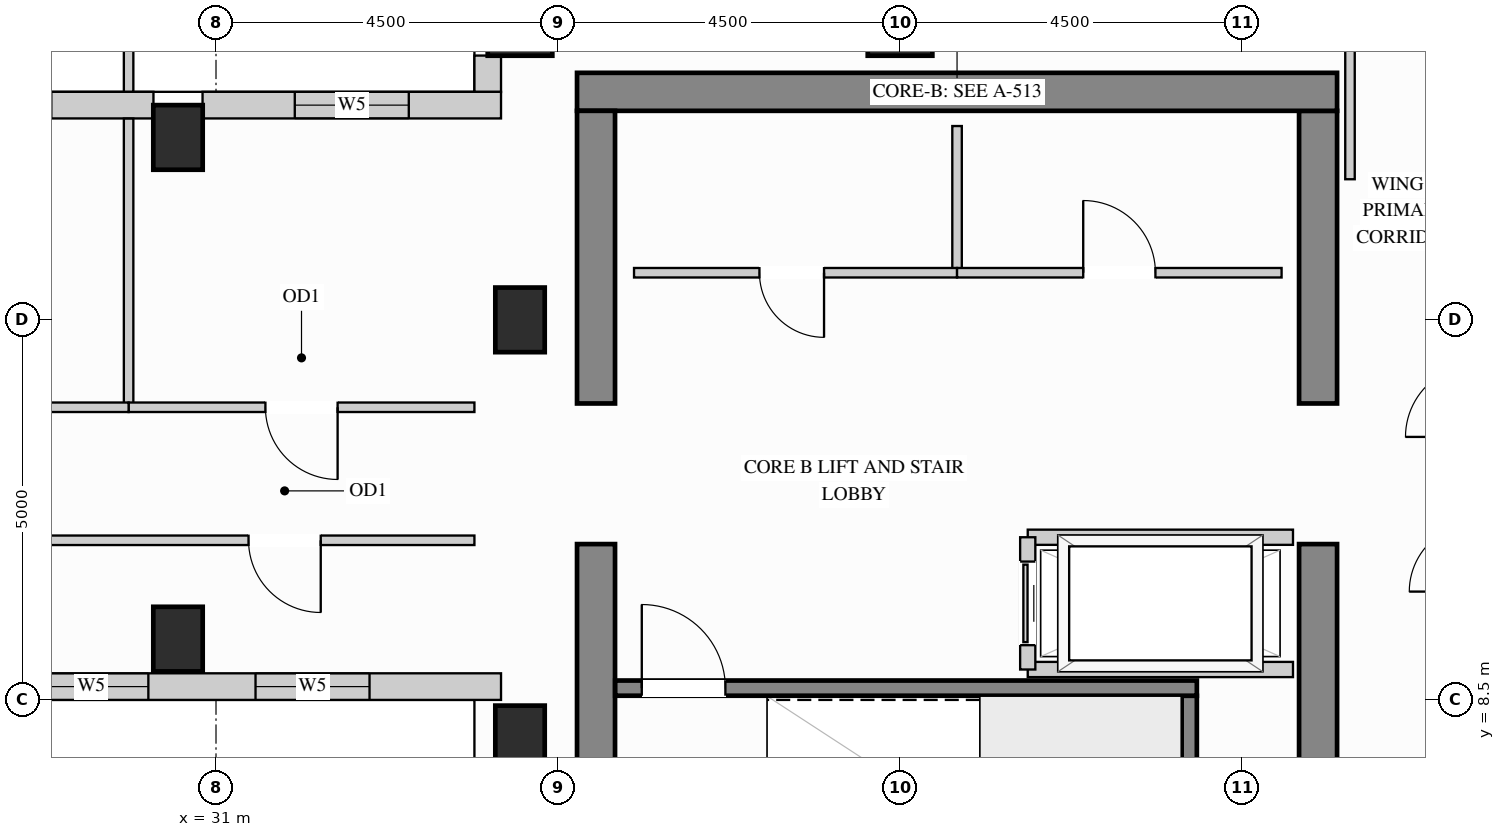
"""IFC4 building model, lengths in metres.
Left out: names, types, materials, properties, quantities, classifications, styles, units other than length and angle.
Written with IfcOpenShell. Run it as: python <this file> out.ifc"""

import sys

from ifc_helpers import new_model, si_unit, direction, frame, frame_2d, origin, origin_2d, place, context, subcontext, project, spatial, rectangle, extrude, source, transform, mapped, element, fill, save


model = new_model("IFC4")
c1 = context("Model", 3, precision=1e-05, world=origin(), true_north=direction((0.0, 1.0)))
c2 = subcontext(c1, "Body", "Model", "MODEL_VIEW")
j1 = project(units=[si_unit("LENGTHUNIT", "METRE"), si_unit("PLANEANGLEUNIT", "RADIAN")], contexts=[c1])
p1 = place(None, origin())
s1 = spatial("IfcSite", under=j1, at=p1, CompositionType="ELEMENT")
p2 = place(p1, origin())
s2 = spatial("IfcBuilding", under=s1, at=p2, CompositionType="ELEMENT")
p3 = place(p2, frame((0.0, 0.0, 237.6)))
s3 = spatial("IfcBuildingStorey", under=s2, at=p3, CompositionType="ELEMENT", Elevation=237.6)
m1 = source(origin(), c2, "Body", "SweptSolid", [
    extrude(rectangle(XDim=0.65, YDim=0.85, at=origin_2d()), origin(), (0.0, 0.0, 1.0), 3.4),
])
for number, where, z_axis, x_axis in (
    (1, (35.0, 13.5, 0.0), (0.0, 0.0, 1.0), (1.0, 0.0, 0.0)),
    (2, (35.0, 8.0, 0.0), (0.0, 0.0, 1.0), (1.0, 0.0, 0.0)),
    (3, (30.5, 15.9, 0.0), (0.0, 0.0, 1.0), (1.0, 0.0, 0.0)),
    (4, (30.5, 9.3, 0.0), (0.0, 0.0, 1.0), (1.0, 0.0, 0.0)),
):
    element("IfcColumn", number, at=place(p3, frame(where, z_axis=z_axis, x_axis=x_axis)), inside=s3, PredefinedType="COLUMN", context=c2, shape_type="MappedRepresentation", body=[
        mapped(m1, transform((0.0, 0.0, 0.0), x_axis=(1.0, 0.0, 0.0), y_axis=(0.0, 1.0, 0.0), z_axis=(0.0, 0.0, 1.0))),
    ])
m2 = source(origin(), c2, "Body", "SweptSolid", [
    extrude(rectangle(XDim=0.85, YDim=0.85, at=origin_2d()), origin(), (0.0, 0.0, 1.0), 3.4),
])
for number, where, z_axis, x_axis in (
    (5, (35.0, 17.4, 0.0), (0.0, 0.0, 1.0), (1.0, 0.0, 0.0)),
    (6, (40.0, 17.4, 0.0), (0.0, 0.0, 1.0), (1.0, 0.0, 0.0)),
):
    element("IfcColumn", number, at=place(p3, frame(where, z_axis=z_axis, x_axis=x_axis)), inside=s3, PredefinedType="COLUMN", context=c2, shape_type="MappedRepresentation", body=[
        mapped(m2, transform((0.0, 0.0, 0.0), x_axis=(1.0, 0.0, 0.0), y_axis=(0.0, 1.0, 0.0), z_axis=(0.0, 0.0, 1.0))),
    ])
m3 = source(origin(), c2, "Body", "SweptSolid", [
    extrude(rectangle(XDim=5.8, YDim=0.5, at=frame_2d((2.9, 0.0))), origin(), (0.0, 0.0, 1.0), 3.4),
])
p4 = place(p3, frame((45.5, 4.75, 0.0), z_axis=(0.0, 0.0, 1.0), x_axis=(0.0, 1.0, 0.0)))
e7 = element("IfcWall", 7, at=p4, inside=s3, PredefinedType="SHEAR", context=c2, shape_type="MappedRepresentation", body=[
    mapped(m3, transform((0.0, 0.0, 0.0), x_axis=(1.0, 0.0, 0.0), y_axis=(0.0, 1.0, 0.0), z_axis=(0.0, 0.0, 1.0))),
])
m4 = source(origin(), c2, "Body", "SweptSolid", [
    extrude(rectangle(XDim=3.85, YDim=0.5, at=frame_2d((1.925, 0.0))), origin(), (0.0, 0.0, 1.0), 3.4),
])
p5 = place(p3, frame((45.5, 12.4, 0.0), z_axis=(0.0, 0.0, 1.0), x_axis=(0.0, 1.0, 0.0)))
e8 = element("IfcWall", 8, at=p5, inside=s3, PredefinedType="SHEAR", context=c2, shape_type="MappedRepresentation", body=[
    mapped(m4, transform((0.0, 0.0, 0.0), x_axis=(1.0, 0.0, 0.0), y_axis=(0.0, 1.0, 0.0), z_axis=(0.0, 0.0, 1.0))),
])
m5 = source(origin(), c2, "Body", "SweptSolid", [
    extrude(rectangle(XDim=10.0, YDim=0.5, at=frame_2d((5.0, 0.0))), origin(), (0.0, 0.0, 1.0), 3.4),
])
p6 = place(p3, frame((35.75, 16.5, 0.0), z_axis=(0.0, 0.0, 1.0), x_axis=(1.0, 0.0, 0.0)))
e9 = element("IfcWall", 9, at=p6, inside=s3, PredefinedType="SHEAR", context=c2, shape_type="MappedRepresentation", body=[
    mapped(m5, transform((0.0, 0.0, 0.0), x_axis=(1.0, 0.0, 0.0), y_axis=(0.0, 1.0, 0.0), z_axis=(0.0, 0.0, 1.0))),
])
p7 = place(p3, frame((36.0, 4.75, 0.0), z_axis=(0.0, 0.0, 1.0), x_axis=(0.0, 1.0, 0.0)))
e10 = element("IfcWall", 10, at=p7, inside=s3, PredefinedType="SHEAR", context=c2, shape_type="MappedRepresentation", body=[
    mapped(m3, transform((0.0, 0.0, 0.0), x_axis=(1.0, 0.0, 0.0), y_axis=(0.0, 1.0, 0.0), z_axis=(0.0, 0.0, 1.0))),
])
p8 = place(p3, frame((36.0, 12.4, 0.0), z_axis=(0.0, 0.0, 1.0), x_axis=(0.0, 1.0, 0.0)))
e11 = element("IfcWall", 11, at=p8, inside=s3, PredefinedType="SHEAR", context=c2, shape_type="MappedRepresentation", body=[
    mapped(m4, transform((0.0, 0.0, 0.0), x_axis=(1.0, 0.0, 0.0), y_axis=(0.0, 1.0, 0.0), z_axis=(0.0, 0.0, 1.0))),
])
p9 = place(p3, frame((19.323, 8.675, 0.0), z_axis=(0.0, 0.0, 1.0), x_axis=(1.0, 0.0, 0.0)))
e12 = element("IfcWall", 12, at=p9, inside=s3, PredefinedType="SOLIDWALL", context=c2, shape_type="SweptSolid", body=[
    extrude(rectangle(XDim=15.427, YDim=0.35, at=frame_2d((7.713, 0.0))), origin(), (0.0, 0.0, 1.0), 3.385),
])
p10 = place(p9, frame((1.672, 0.0, 0.78)))
e13 = element("IfcOpeningElement", 13, at=p10, cuts=e12, PredefinedType="OPENING", context=c2, shape_type="SweptSolid", body=[
    extrude(rectangle(XDim=1.5, YDim=2.0, at=frame_2d((0.75, 1.0))), frame((0.0, 0.185, 0.0), z_axis=(0.0, -1.0, 0.0), x_axis=(1.0, 0.0, 0.0)), (0.0, 0.0, 1.0), 0.37),
])
p11 = place(p9, frame((4.525, 0.0, 0.78)))
e14 = element("IfcOpeningElement", 14, at=p11, cuts=e12, PredefinedType="OPENING", context=c2, shape_type="SweptSolid", body=[
    extrude(rectangle(XDim=1.5, YDim=2.0, at=frame_2d((0.75, 1.0))), frame((0.0, 0.185, 0.0), z_axis=(0.0, -1.0, 0.0), x_axis=(1.0, 0.0, 0.0)), (0.0, 0.0, 1.0), 0.37),
])
p12 = place(p9, frame((9.287, 0.0, 0.78)))
e15 = element("IfcOpeningElement", 15, at=p12, cuts=e12, PredefinedType="OPENING", context=c2, shape_type="SweptSolid", body=[
    extrude(rectangle(XDim=1.5, YDim=2.0, at=frame_2d((0.75, 1.0))), frame((0.0, 0.185, 0.0), z_axis=(0.0, -1.0, 0.0), x_axis=(1.0, 0.0, 0.0)), (0.0, 0.0, 1.0), 0.37),
])
p13 = place(p9, frame((12.197, 0.0, 0.78)))
e16 = element("IfcOpeningElement", 16, at=p13, cuts=e12, PredefinedType="OPENING", context=c2, shape_type="SweptSolid", body=[
    extrude(rectangle(XDim=1.5, YDim=2.0, at=frame_2d((0.75, 1.0))), frame((0.0, 0.185, 0.0), z_axis=(0.0, -1.0, 0.0), x_axis=(1.0, 0.0, 0.0)), (0.0, 0.0, 1.0), 0.37),
])
m6 = source(origin(), c2, "Body", "SweptSolid", [
    extrude(rectangle(XDim=0.479, YDim=0.35, at=frame_2d((0.24, 0.0))), origin(), (0.0, 0.0, 1.0), 3.385),
])
p14 = place(p3, frame((34.575, 16.977, 0.0), z_axis=(0.0, 0.0, 1.0), x_axis=(0.0, -1.0, 0.0)))
e17 = element("IfcWall", 17, at=p14, inside=s3, PredefinedType="SOLIDWALL", context=c2, shape_type="MappedRepresentation", body=[
    mapped(m6, transform((0.0, 0.0, 0.0), x_axis=(1.0, 0.0, 0.0), y_axis=(0.0, 1.0, 0.0), z_axis=(0.0, 0.0, 1.0))),
])
p15 = place(p3, frame((34.75, 16.325, 0.0), z_axis=(0.0, 0.0, 1.0), x_axis=(-1.0, 0.0, 0.0)))
e18 = element("IfcWall", 18, at=p15, inside=s3, PredefinedType="SOLIDWALL", context=c2, shape_type="SweptSolid", body=[
    extrude(rectangle(XDim=3.927, YDim=0.35, at=frame_2d((1.963, 0.0))), origin(), (0.0, 0.0, 1.0), 3.385),
])
p16 = place(p15, frame((1.213, 0.0, 0.78)))
e19 = element("IfcOpeningElement", 19, at=p16, cuts=e18, PredefinedType="OPENING", context=c2, shape_type="SweptSolid", body=[
    extrude(rectangle(XDim=1.5, YDim=2.0, at=frame_2d((0.75, 1.0))), frame((0.0, 0.185, 0.0), z_axis=(0.0, -1.0, 0.0), x_axis=(1.0, 0.0, 0.0)), (0.0, 0.0, 1.0), 0.37),
])
p17 = place(p3, frame((30.177, 16.325, 0.0), z_axis=(0.0, 0.0, 1.0), x_axis=(-1.0, 0.0, 0.0)))
e20 = element("IfcWall", 20, at=p17, inside=s3, PredefinedType="SOLIDWALL", context=c2, shape_type="SweptSolid", body=[
    extrude(rectangle(XDim=6.454, YDim=0.35, at=frame_2d((3.227, 0.0))), origin(), (0.0, 0.0, 1.0), 3.385),
])
p18 = place(p17, frame((1.344, 0.0, 0.78)))
e21 = element("IfcOpeningElement", 21, at=p18, cuts=e20, PredefinedType="OPENING", context=c2, shape_type="SweptSolid", body=[
    extrude(rectangle(XDim=1.5, YDim=2.0, at=frame_2d((0.75, 1.0))), frame((0.0, 0.185, 0.0), z_axis=(0.0, -1.0, 0.0), x_axis=(1.0, 0.0, 0.0)), (0.0, 0.0, 1.0), 0.37),
])
p19 = place(p17, frame((3.61, 0.0, 0.78)))
e22 = element("IfcOpeningElement", 22, at=p19, cuts=e20, PredefinedType="OPENING", context=c2, shape_type="SweptSolid", body=[
    extrude(rectangle(XDim=1.5, YDim=2.0, at=frame_2d((0.75, 1.0))), frame((0.0, 0.185, 0.0), z_axis=(0.0, -1.0, 0.0), x_axis=(1.0, 0.0, 0.0)), (0.0, 0.0, 1.0), 0.37),
])
m7 = source(origin(), c2, "Body", "SweptSolid", [
    extrude(rectangle(XDim=1.93, YDim=0.125, at=frame_2d((0.965, 0.0))), origin(), (0.0, 0.0, 1.0), 3.385),
])
p20 = place(p3, frame((40.75, 14.12, 0.0), z_axis=(0.0, 0.0, 1.0), x_axis=(0.0, 1.0, 0.0)))
e23 = element("IfcWall", 23, at=p20, inside=s3, PredefinedType="PARTITIONING", context=c2, shape_type="MappedRepresentation", body=[
    mapped(m7, transform((0.0, 0.0, 0.0), x_axis=(1.0, 0.0, 0.0), y_axis=(0.0, 1.0, 0.0), z_axis=(0.0, 0.0, 1.0))),
])
p21 = place(p3, frame((36.5, 14.12, 0.0), z_axis=(0.0, 0.0, 1.0), x_axis=(1.0, 0.0, 0.0)))
e24 = element("IfcWall", 24, at=p21, inside=s3, PredefinedType="PARTITIONING", context=c2, shape_type="SweptSolid", body=[
    extrude(rectangle(XDim=4.25, YDim=0.125, at=frame_2d((2.125, 0.0))), origin(), (0.0, 0.0, 1.0), 3.385),
])
p22 = place(p21, frame((1.65, 0.0, 0.0)))
e25 = element("IfcOpeningElement", 25, at=p22, cuts=e24, PredefinedType="OPENING", context=c2, shape_type="SweptSolid", body=[
    extrude(rectangle(XDim=0.85, YDim=2.1, at=frame_2d((0.425, 1.05))), frame((0.0, 0.073, 0.0), z_axis=(0.0, -1.0, 0.0), x_axis=(1.0, 0.0, 0.0)), (0.0, 0.0, 1.0), 0.145),
])
p23 = place(p3, frame((40.75, 14.12, 0.0), z_axis=(0.0, 0.0, 1.0), x_axis=(1.0, 0.0, 0.0)))
e26 = element("IfcWall", 26, at=p23, inside=s3, PredefinedType="PARTITIONING", context=c2, shape_type="SweptSolid", body=[
    extrude(rectangle(XDim=4.27, YDim=0.125, at=frame_2d((2.135, 0.0))), origin(), (0.0, 0.0, 1.0), 3.385),
])
p24 = place(p23, frame((1.66, 0.0, 0.0)))
e27 = element("IfcOpeningElement", 27, at=p24, cuts=e26, PredefinedType="OPENING", context=c2, shape_type="SweptSolid", body=[
    extrude(rectangle(XDim=0.95, YDim=2.15, at=frame_2d((0.475, 1.075))), frame((0.0, 0.073, 0.0), z_axis=(0.0, -1.0, 0.0), x_axis=(1.0, 0.0, 0.0)), (0.0, 0.0, 1.0), 0.145),
])
m8 = source(origin(), c2, "Body", "SweptSolid", [
    extrude(rectangle(XDim=2.298, YDim=0.125, at=frame_2d((1.149, 0.0))), origin(), (0.0, 0.0, 1.0), 3.385),
])
p25 = place(p3, frame((45.92, 15.35, 0.0), z_axis=(0.0, 0.0, 1.0), x_axis=(0.0, 1.0, 0.0)))
e28 = element("IfcWall", 28, at=p25, inside=s3, PredefinedType="PARTITIONING", context=c2, shape_type="MappedRepresentation", body=[
    mapped(m8, transform((0.0, 0.0, 0.0), x_axis=(1.0, 0.0, 0.0), y_axis=(0.0, 1.0, 0.0), z_axis=(0.0, 0.0, 1.0))),
])
m9 = source(origin(), c2, "Body", "SweptSolid", [
    extrude(rectangle(XDim=3.798, YDim=0.125, at=frame_2d((1.899, 0.0))), origin(), (0.0, 0.0, 1.0), 3.385),
])
p26 = place(p3, frame((29.85, 12.35, 0.0), z_axis=(0.0, 0.0, 1.0), x_axis=(0.0, 1.0, 0.0)))
e29 = element("IfcWall", 29, at=p26, inside=s3, PredefinedType="PARTITIONING", context=c2, shape_type="MappedRepresentation", body=[
    mapped(m9, transform((0.0, 0.0, 0.0), x_axis=(1.0, 0.0, 0.0), y_axis=(0.0, 1.0, 0.0), z_axis=(0.0, 0.0, 1.0))),
])
m10 = source(origin(), c2, "Body", "SweptSolid", [
    extrude(rectangle(XDim=7.148, YDim=0.125, at=frame_2d((3.574, 0.0))), origin(), (0.0, 0.0, 1.0), 3.385),
])
p27 = place(p3, frame((29.85, 16.502, 0.0), z_axis=(0.0, 0.0, 1.0), x_axis=(0.0, 1.0, 0.0)))
e30 = element("IfcWall", 30, at=p27, inside=s3, PredefinedType="PARTITIONING", context=c2, shape_type="MappedRepresentation", body=[
    mapped(m10, transform((0.0, 0.0, 0.0), x_axis=(1.0, 0.0, 0.0), y_axis=(0.0, 1.0, 0.0), z_axis=(0.0, 0.0, 1.0))),
])
p28 = place(p3, frame((29.85, 12.35, 0.0), z_axis=(0.0, 0.0, 1.0), x_axis=(1.0, 0.0, 0.0)))
e31 = element("IfcWall", 31, at=p28, inside=s3, PredefinedType="PARTITIONING", context=c2, shape_type="SweptSolid", body=[
    extrude(rectangle(XDim=4.55, YDim=0.125, at=frame_2d((2.275, 0.0))), origin(), (0.0, 0.0, 1.0), 3.385),
])
p29 = place(p28, frame((1.8, 0.0, 0.0)))
e32 = element("IfcOpeningElement", 32, at=p29, cuts=e31, PredefinedType="OPENING", context=c2, shape_type="SweptSolid", body=[
    extrude(rectangle(XDim=0.95, YDim=2.15, at=frame_2d((0.475, 1.075))), frame((0.0, 0.073, 0.0), z_axis=(0.0, -1.0, 0.0), x_axis=(1.0, 0.0, 0.0)), (0.0, 0.0, 1.0), 0.145),
])
p30 = place(p3, frame((24.05, 12.35, 0.0), z_axis=(0.0, 0.0, 1.0), x_axis=(1.0, 0.0, 0.0)))
e33 = element("IfcWall", 33, at=p30, inside=s3, PredefinedType="PARTITIONING", context=c2, shape_type="SweptSolid", body=[
    extrude(rectangle(XDim=5.8, YDim=0.125, at=frame_2d((2.9, 0.0))), origin(), (0.0, 0.0, 1.0), 3.385),
])
p31 = place(p30, frame((2.425, 0.0, 0.0)))
e34 = element("IfcOpeningElement", 34, at=p31, cuts=e33, PredefinedType="OPENING", context=c2, shape_type="SweptSolid", body=[
    extrude(rectangle(XDim=0.95, YDim=2.15, at=frame_2d((0.475, 1.075))), frame((0.0, 0.073, 0.0), z_axis=(0.0, -1.0, 0.0), x_axis=(1.0, 0.0, 0.0)), (0.0, 0.0, 1.0), 0.145),
])
p32 = place(p3, frame((26.95, 10.6, 0.0), z_axis=(0.0, 0.0, 1.0), x_axis=(1.0, 0.0, 0.0)))
e35 = element("IfcWall", 35, at=p32, inside=s3, PredefinedType="PARTITIONING", context=c2, shape_type="SweptSolid", body=[
    extrude(rectangle(XDim=7.45, YDim=0.125, at=frame_2d((3.725, 0.0))), origin(), (0.0, 0.0, 1.0), 3.385),
])
p33 = place(p32, frame((4.478, 0.0, 0.0)))
e36 = element("IfcOpeningElement", 36, at=p33, cuts=e35, PredefinedType="OPENING", context=c2, shape_type="SweptSolid", body=[
    extrude(rectangle(XDim=0.95, YDim=2.15, at=frame_2d((0.475, 1.075))), frame((0.0, 0.073, 0.0), z_axis=(0.0, -1.0, 0.0), x_axis=(1.0, 0.0, 0.0)), (0.0, 0.0, 1.0), 0.145),
])
m11 = source(origin(), c2, "Body", "SweptSolid", [
    extrude(rectangle(XDim=3.49, YDim=0.2, at=frame_2d((1.745, 0.0))), origin(), (0.0, 0.0, 1.0), 3.385),
])
for number, where, z_axis, x_axis in (
    (37, (41.68, 10.64, 0.0), (0.0, 0.0, 1.0), (1.0, 0.0, 0.0)),
    (38, (41.68, 8.9, 0.0), (0.0, 0.0, 1.0), (1.0, 0.0, 0.0)),
):
    element("IfcWall", number, at=place(p3, frame(where, z_axis=z_axis, x_axis=x_axis)), inside=s3, PredefinedType="PARTITIONING", context=c2, shape_type="MappedRepresentation", body=[
        mapped(m11, transform((0.0, 0.0, 0.0), x_axis=(1.0, 0.0, 0.0), y_axis=(0.0, 1.0, 0.0), z_axis=(0.0, 0.0, 1.0))),
    ])
p34 = place(p3, frame((41.68, 8.9, 0.0), z_axis=(0.0, 0.0, 1.0), x_axis=(0.0, 1.0, 0.0)))
e39 = element("IfcWall", 39, at=p34, inside=s3, PredefinedType="PARTITIONING", context=c2, shape_type="SweptSolid", body=[
    extrude(rectangle(XDim=1.74, YDim=0.2, at=frame_2d((0.87, 0.0))), origin(), (0.0, 0.0, 1.0), 3.385),
])
p35 = place(p34, frame((0.32, 0.0, 0.0)))
e40 = element("IfcOpeningElement", 40, at=p35, cuts=e39, PredefinedType="OPENING", context=c2, shape_type="SweptSolid", body=[
    extrude(rectangle(XDim=1.1, YDim=2.2, at=frame_2d((0.55, 1.1))), frame((0.0, 0.11, 0.0), z_axis=(0.0, -1.0, 0.0), x_axis=(1.0, 0.0, 0.0)), (0.0, 0.0, 1.0), 0.22),
])
m12 = source(origin(), c2, "Body", "SweptSolid", [
    extrude(rectangle(XDim=3.803, YDim=0.2, at=frame_2d((1.901, 0.0))), origin(), (0.0, 0.0, 1.0), 3.4),
])
p36 = place(p3, frame((43.805, 4.752, 0.0), z_axis=(0.0, 0.0, 1.0), x_axis=(0.0, 1.0, 0.0)))
e41 = element("IfcWall", 41, at=p36, inside=s3, PredefinedType="SHEAR", context=c2, shape_type="MappedRepresentation", body=[
    mapped(m12, transform((0.0, 0.0, 0.0), x_axis=(1.0, 0.0, 0.0), y_axis=(0.0, 1.0, 0.0), z_axis=(0.0, 0.0, 1.0))),
])
p37 = place(p3, frame((36.252, 8.655, 0.0), z_axis=(0.0, 0.0, 1.0), x_axis=(1.0, 0.0, 0.0)))
e42 = element("IfcWall", 42, at=p37, inside=s3, PredefinedType="SHEAR", context=c2, shape_type="SweptSolid", body=[
    extrude(rectangle(XDim=7.653, YDim=0.2, at=frame_2d((3.827, 0.0))), origin(), (0.0, 0.0, 1.0), 3.4),
])
p38 = place(p37, frame((0.35, 0.0, 0.0)))
e43 = element("IfcOpeningElement", 43, at=p38, cuts=e42, PredefinedType="OPENING", context=c2, shape_type="SweptSolid", body=[
    extrude(rectangle(XDim=1.1, YDim=2.15, at=frame_2d((0.55, 1.075))), frame((0.0, 0.11, 0.0), z_axis=(0.0, -1.0, 0.0), x_axis=(1.0, 0.0, 0.0)), (0.0, 0.0, 1.0), 0.22),
])
m13 = source(origin(), c2, "Body", "SweptSolid", [
    extrude(rectangle(XDim=1.1, YDim=2.2, at=frame_2d((0.55, 1.1))), frame((0.0, 0.025, 0.0), z_axis=(0.0, -1.0, 0.0), x_axis=(1.0, 0.0, 0.0)), (0.0, 0.0, 1.0), 0.05),
])
p39 = place(p35, origin())
e44 = element("IfcDoor", 44, at=p39, inside=s3, OperationType="SLIDING_TO_LEFT", PredefinedType="DOOR", context=c2, shape_type="MappedRepresentation", body=[
    mapped(m13, transform((0.0, 0.0, 0.0), x_axis=(1.0, 0.0, 0.0), y_axis=(0.0, 1.0, 0.0), z_axis=(0.0, 0.0, 1.0))),
])
fill(e40, e44)
m14 = source(origin(), c2, "Body", "SweptSolid", [
    extrude(rectangle(XDim=0.95, YDim=2.15, at=frame_2d((0.475, 1.075))), frame((0.0, 0.025, 0.0), z_axis=(0.0, -1.0, 0.0), x_axis=(1.0, 0.0, 0.0)), (0.0, 0.0, 1.0), 0.05),
])
p40 = place(p24, origin())
e45 = element("IfcDoor", 45, at=p40, inside=s3, OperationType="SINGLE_SWING_LEFT", PredefinedType="DOOR", context=c2, shape_type="MappedRepresentation", body=[
    mapped(m14, transform((0.0, 0.0, 0.0), x_axis=(1.0, 0.0, 0.0), y_axis=(0.0, 1.0, 0.0), z_axis=(0.0, 0.0, 1.0))),
])
fill(e27, e45)
p41 = place(p29, origin())
e46 = element("IfcDoor", 46, at=p41, inside=s3, OperationType="SINGLE_SWING_RIGHT", PredefinedType="DOOR", context=c2, shape_type="MappedRepresentation", body=[
    mapped(m14, transform((0.0, 0.0, 0.0), x_axis=(1.0, 0.0, 0.0), y_axis=(0.0, 1.0, 0.0), z_axis=(0.0, 0.0, 1.0))),
])
fill(e32, e46)
p42 = place(p33, origin())
e47 = element("IfcDoor", 47, at=p42, inside=s3, OperationType="SINGLE_SWING_RIGHT", PredefinedType="DOOR", context=c2, shape_type="MappedRepresentation", body=[
    mapped(m14, transform((0.0, 0.0, 0.0), x_axis=(1.0, 0.0, 0.0), y_axis=(0.0, 1.0, 0.0), z_axis=(0.0, 0.0, 1.0))),
])
fill(e36, e47)
m15 = source(origin(), c2, "Body", "SweptSolid", [
    extrude(rectangle(XDim=0.85, YDim=2.1, at=frame_2d((0.425, 1.05))), frame((0.0, 0.025, 0.0), z_axis=(0.0, -1.0, 0.0), x_axis=(1.0, 0.0, 0.0)), (0.0, 0.0, 1.0), 0.05),
])
p43 = place(p22, origin())
e48 = element("IfcDoor", 48, at=p43, inside=s3, OperationType="SINGLE_SWING_RIGHT", PredefinedType="DOOR", context=c2, shape_type="MappedRepresentation", body=[
    mapped(m15, transform((0.0, 0.0, 0.0), x_axis=(1.0, 0.0, 0.0), y_axis=(0.0, 1.0, 0.0), z_axis=(0.0, 0.0, 1.0))),
])
fill(e25, e48)
m16 = source(origin(), c2, "Body", "SweptSolid", [
    extrude(rectangle(XDim=1.1, YDim=2.15, at=frame_2d((0.55, 1.075))), frame((0.0, 0.025, 0.0), z_axis=(0.0, -1.0, 0.0), x_axis=(1.0, 0.0, 0.0)), (0.0, 0.0, 1.0), 0.05),
])
p44 = place(p38, origin())
e49 = element("IfcDoor", 49, at=p44, inside=s3, OperationType="SINGLE_SWING_LEFT", PredefinedType="DOOR", context=c2, shape_type="MappedRepresentation", body=[
    mapped(m16, transform((0.0, 0.0, 0.0), x_axis=(1.0, 0.0, 0.0), y_axis=(0.0, 1.0, 0.0), z_axis=(0.0, 0.0, 1.0))),
])
fill(e43, e49)
m17 = source(origin(), c2, "Body", "SweptSolid", [
    extrude(rectangle(XDim=1.5, YDim=2.0, at=frame_2d((0.75, 1.0))), frame((0.0, 0.03, 0.0), z_axis=(0.0, -1.0, 0.0), x_axis=(1.0, 0.0, 0.0)), (0.0, 0.0, 1.0), 0.06),
])
p45 = place(p12, origin())
e50 = element("IfcWindow", 50, at=p45, inside=s3, PartitioningType="SINGLE_PANEL", PredefinedType="WINDOW", context=c2, shape_type="MappedRepresentation", body=[
    mapped(m17, transform((0.0, 0.0, 0.0), x_axis=(1.0, 0.0, 0.0), y_axis=(0.0, 1.0, 0.0), z_axis=(0.0, 0.0, 1.0))),
])
fill(e15, e50)
p46 = place(p13, origin())
e51 = element("IfcWindow", 51, at=p46, inside=s3, PartitioningType="SINGLE_PANEL", PredefinedType="WINDOW", context=c2, shape_type="MappedRepresentation", body=[
    mapped(m17, transform((0.0, 0.0, 0.0), x_axis=(1.0, 0.0, 0.0), y_axis=(0.0, 1.0, 0.0), z_axis=(0.0, 0.0, 1.0))),
])
fill(e16, e51)
p47 = place(p16, origin())
e52 = element("IfcWindow", 52, at=p47, inside=s3, PartitioningType="SINGLE_PANEL", PredefinedType="WINDOW", context=c2, shape_type="MappedRepresentation", body=[
    mapped(m17, transform((0.0, 0.0, 0.0), x_axis=(1.0, 0.0, 0.0), y_axis=(0.0, 1.0, 0.0), z_axis=(0.0, 0.0, 1.0))),
])
fill(e19, e52)
save(model, sys.argv[1])
